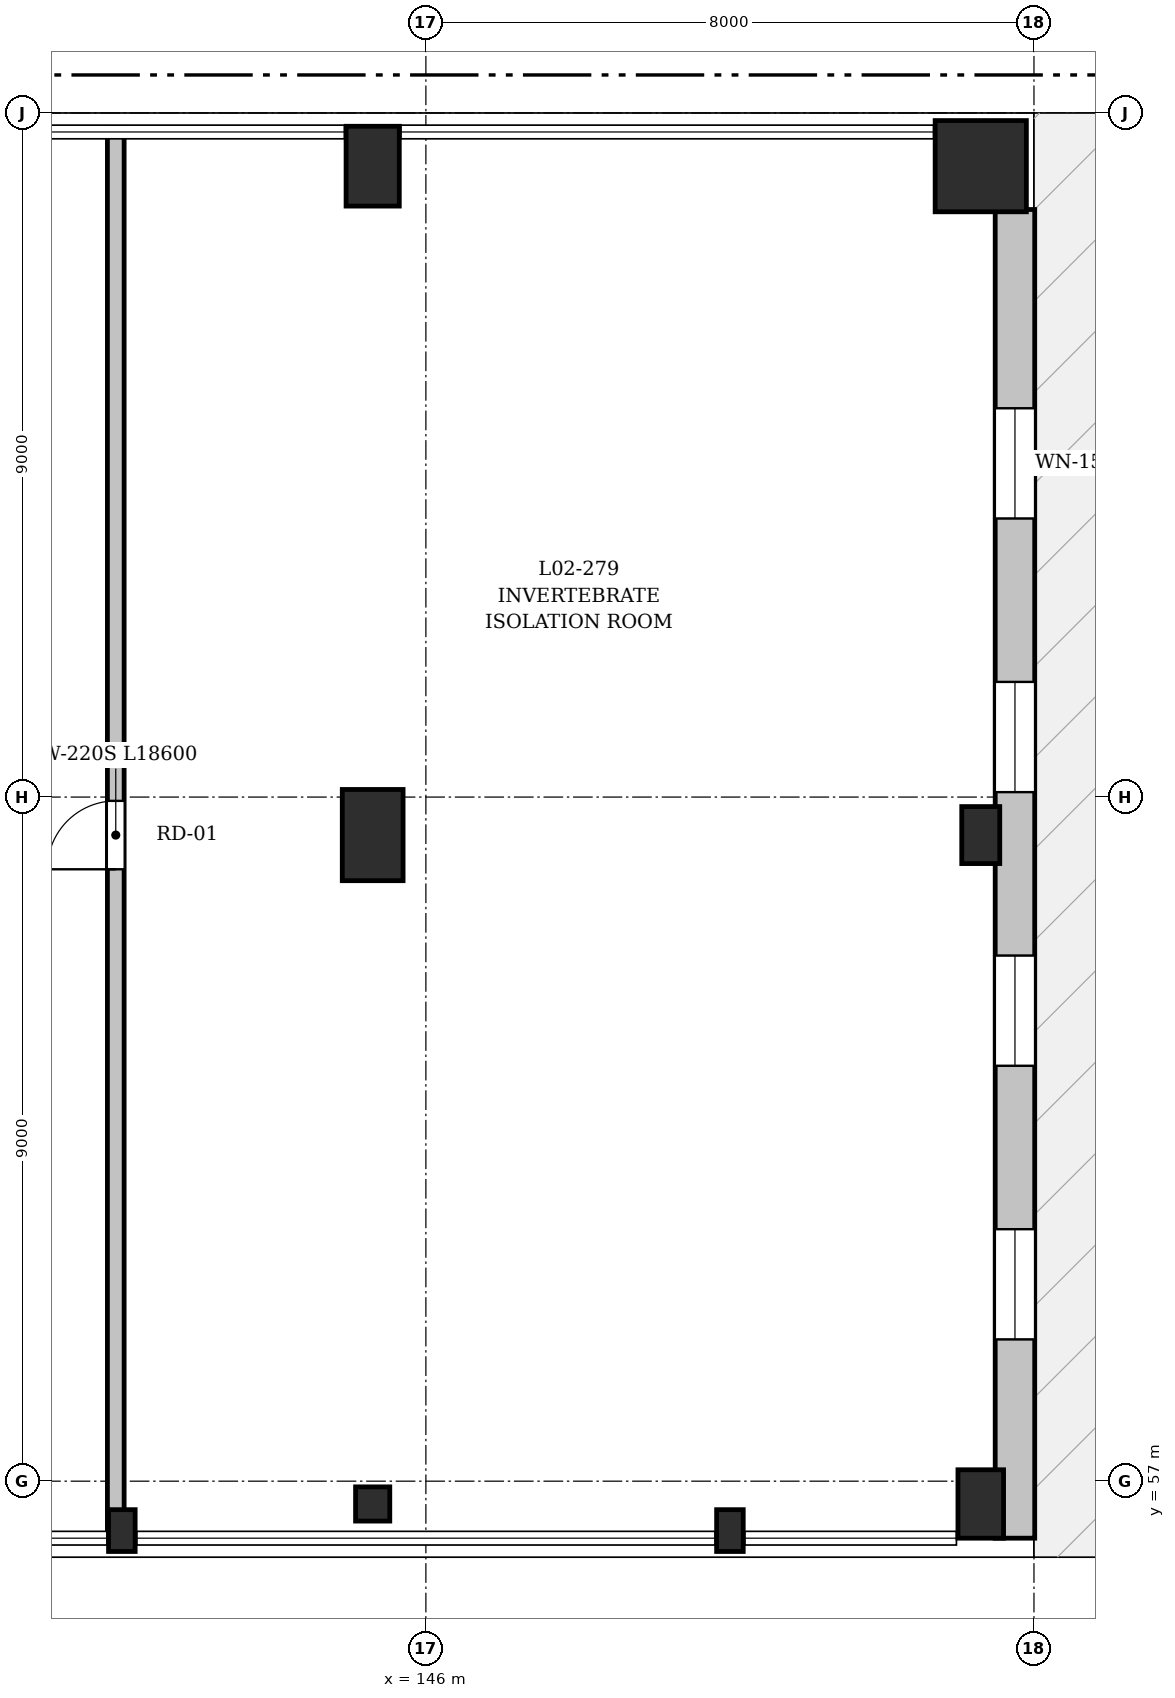
"""IFC4 building model, lengths in metres.
Left out: names, types, materials, properties, quantities, classifications, styles, units other than length and angle.
Written with IfcOpenShell. Run it as: python <this file> out.ifc"""

import sys

from ifc_helpers import new_model, si_unit, direction, frame, frame_2d, origin, origin_2d, place, context, subcontext, project, spatial, rectangle, extrude, element, fill, save


model = new_model("IFC4")
c1 = context("Model", 3, precision=1e-05, world=origin(), true_north=direction((0.0, 1.0)))
c2 = subcontext(c1, "Body", "Model", "MODEL_VIEW")
j1 = project(units=[si_unit("LENGTHUNIT", "METRE"), si_unit("PLANEANGLEUNIT", "RADIAN")], contexts=[c1])
p1 = place(None, origin())
s1 = spatial("IfcSite", under=j1, at=p1, CompositionType="ELEMENT")
p2 = place(p1, origin())
s2 = spatial("IfcBuilding", under=s1, at=p2, CompositionType="ELEMENT")
p3 = place(p2, frame((0.0, 0.0, 5.4)))
s3 = spatial("IfcBuildingStorey", under=s2, at=p3, CompositionType="ELEMENT", Elevation=5.4)
p4 = place(p3, frame((145.3, 56.7, 0.0), z_axis=(0.0, 0.0, 1.0), x_axis=(1.0, 0.0, 0.0)))
e1 = element("IfcColumn", 1, at=p4, inside=s3, PredefinedType="COLUMN", context=c2, shape_type="SweptSolid", body=[
    extrude(rectangle(XDim=0.45, YDim=0.45, at=origin_2d()), origin(), (0.0, 0.0, 1.0), 4.45),
])
p5 = place(p3, frame((145.3, 65.5, 0.0), z_axis=(0.0, 0.0, 1.0), x_axis=(1.0, 0.0, 0.0)))
e2 = element("IfcColumn", 2, at=p5, inside=s3, PredefinedType="COLUMN", context=c2, shape_type="SweptSolid", body=[
    extrude(rectangle(XDim=0.8, YDim=1.2, at=origin_2d()), origin(), (0.0, 0.0, 1.0), 4.45),
])
p6 = place(p3, frame((145.3, 74.3, 0.0), z_axis=(0.0, 0.0, 1.0), x_axis=(1.0, 0.0, 0.0)))
e3 = element("IfcColumn", 3, at=p6, inside=s3, PredefinedType="COLUMN", context=c2, shape_type="SweptSolid", body=[
    extrude(rectangle(XDim=0.7, YDim=1.05, at=origin_2d()), origin(), (0.0, 0.0, 1.0), 4.45),
])
p7 = place(p3, frame((153.3, 56.7, 0.0), z_axis=(0.0, 0.0, 1.0), x_axis=(1.0, 0.0, 0.0)))
e4 = element("IfcColumn", 4, at=p7, inside=s3, PredefinedType="COLUMN", context=c2, shape_type="SweptSolid", body=[
    extrude(rectangle(XDim=0.6, YDim=0.9, at=origin_2d()), origin(), (0.0, 0.0, 1.0), 4.45),
])
p8 = place(p3, frame((153.3, 65.5, 0.0), z_axis=(0.0, 0.0, 1.0), x_axis=(1.0, 0.0, 0.0)))
e5 = element("IfcColumn", 5, at=p8, inside=s3, PredefinedType="COLUMN", context=c2, shape_type="SweptSolid", body=[
    extrude(rectangle(XDim=0.5, YDim=0.75, at=origin_2d()), origin(), (0.0, 0.0, 1.0), 4.45),
])
p9 = place(p3, frame((153.3, 74.3, 0.0), z_axis=(0.0, 0.0, 1.0), x_axis=(1.0, 0.0, 0.0)))
e6 = element("IfcColumn", 6, at=p9, inside=s3, PredefinedType="COLUMN", context=c2, shape_type="SweptSolid", body=[
    extrude(rectangle(XDim=1.2, YDim=1.2, at=origin_2d()), origin(), (0.0, 0.0, 1.0), 4.45),
])
for number, where, z_axis, x_axis in (
    (7, (142.0, 56.35, 0.0), (0.0, 0.0, 1.0), (1.0, 0.0, 0.0)),
    (8, (150.0, 56.35, 0.0), (0.0, 0.0, 1.0), (1.0, 0.0, 0.0)),
):
    element("IfcColumn", number, at=place(p3, frame(where, z_axis=z_axis, x_axis=x_axis)), inside=s3, PredefinedType="PILASTER", context=c2, shape_type="SweptSolid", body=[
        extrude(rectangle(XDim=0.35, YDim=0.55, at=origin_2d()), origin(), (0.0, 0.0, 1.0), 4.45),
    ])
p10 = place(p3, frame((153.75, 73.73, 0.0), z_axis=(0.0, 0.0, 1.0), x_axis=(0.0, -1.0, 0.0)))
e9 = element("IfcWall", 9, at=p10, inside=s3, PredefinedType="SOLIDWALL", context=c2, shape_type="SweptSolid", body=[
    extrude(rectangle(XDim=17.48, YDim=0.52, at=frame_2d((8.74, 0.0))), origin(), (0.0, 0.0, 1.0), 3.59),
])
p11 = place(p10, frame((2.615, 0.0, 0.9)))
e10 = element("IfcOpeningElement", 10, at=p11, cuts=e9, PredefinedType="OPENING", context=c2, shape_type="SweptSolid", body=[
    extrude(rectangle(XDim=1.45, YDim=1.5, at=frame_2d((0.725, 0.75))), frame((0.0, 0.27, 0.0), z_axis=(0.0, -1.0, 0.0), x_axis=(1.0, 0.0, 0.0)), (0.0, 0.0, 1.0), 0.54),
])
p12 = place(p10, frame((6.215, 0.0, 0.9)))
e11 = element("IfcOpeningElement", 11, at=p12, cuts=e9, PredefinedType="OPENING", context=c2, shape_type="SweptSolid", body=[
    extrude(rectangle(XDim=1.45, YDim=1.5, at=frame_2d((0.725, 0.75))), frame((0.0, 0.27, 0.0), z_axis=(0.0, -1.0, 0.0), x_axis=(1.0, 0.0, 0.0)), (0.0, 0.0, 1.0), 0.54),
])
p13 = place(p10, frame((9.815, 0.0, 0.9)))
e12 = element("IfcOpeningElement", 12, at=p13, cuts=e9, PredefinedType="OPENING", context=c2, shape_type="SweptSolid", body=[
    extrude(rectangle(XDim=1.45, YDim=1.5, at=frame_2d((0.725, 0.75))), frame((0.0, 0.27, 0.0), z_axis=(0.0, -1.0, 0.0), x_axis=(1.0, 0.0, 0.0)), (0.0, 0.0, 1.0), 0.54),
])
p14 = place(p10, frame((13.415, 0.0, 0.9)))
e13 = element("IfcOpeningElement", 13, at=p14, cuts=e9, PredefinedType="OPENING", context=c2, shape_type="SweptSolid", body=[
    extrude(rectangle(XDim=1.45, YDim=1.5, at=frame_2d((0.725, 0.75))), frame((0.0, 0.27, 0.0), z_axis=(0.0, -1.0, 0.0), x_axis=(1.0, 0.0, 0.0)), (0.0, 0.0, 1.0), 0.54),
])
p15 = place(p3, frame((141.92, 56.2, 0.0), z_axis=(0.0, 0.0, 1.0), x_axis=(0.0, 1.0, 0.0)))
e14 = element("IfcWall", 14, at=p15, inside=s3, PredefinedType="SOLIDWALL", context=c2, shape_type="SweptSolid", body=[
    extrude(rectangle(XDim=18.6, YDim=0.22, at=frame_2d((9.3, 0.0))), origin(), (0.0, 0.0, 1.0), 3.44),
])
p16 = place(p15, frame((8.85, 0.0, 0.0)))
e15 = element("IfcOpeningElement", 15, at=p16, cuts=e14, PredefinedType="OPENING", context=c2, shape_type="SweptSolid", body=[
    extrude(rectangle(XDim=0.9, YDim=2.1, at=frame_2d((0.45, 1.05))), frame((0.0, 0.12, 0.0), z_axis=(0.0, -1.0, 0.0), x_axis=(1.0, 0.0, 0.0)), (0.0, 0.0, 1.0), 0.24),
])
p17 = place(p11, origin())
e16 = element("IfcWindow", 16, at=p17, inside=s3, PartitioningType="DOUBLE_PANEL_VERTICAL", PredefinedType="WINDOW", context=c2, shape_type="SweptSolid", body=[
    extrude(rectangle(XDim=1.45, YDim=1.5, at=frame_2d((0.725, 0.75))), frame((0.0, 0.03, 0.0), z_axis=(0.0, -1.0, 0.0), x_axis=(1.0, 0.0, 0.0)), (0.0, 0.0, 1.0), 0.06),
])
fill(e10, e16)
p18 = place(p12, origin())
e17 = element("IfcWindow", 17, at=p18, inside=s3, PartitioningType="DOUBLE_PANEL_VERTICAL", PredefinedType="WINDOW", context=c2, shape_type="SweptSolid", body=[
    extrude(rectangle(XDim=1.45, YDim=1.5, at=frame_2d((0.725, 0.75))), frame((0.0, 0.03, 0.0), z_axis=(0.0, -1.0, 0.0), x_axis=(1.0, 0.0, 0.0)), (0.0, 0.0, 1.0), 0.06),
])
fill(e11, e17)
p19 = place(p13, origin())
e18 = element("IfcWindow", 18, at=p19, inside=s3, PartitioningType="DOUBLE_PANEL_VERTICAL", PredefinedType="WINDOW", context=c2, shape_type="SweptSolid", body=[
    extrude(rectangle(XDim=1.45, YDim=1.5, at=frame_2d((0.725, 0.75))), frame((0.0, 0.03, 0.0), z_axis=(0.0, -1.0, 0.0), x_axis=(1.0, 0.0, 0.0)), (0.0, 0.0, 1.0), 0.06),
])
fill(e12, e18)
p20 = place(p14, origin())
e19 = element("IfcWindow", 19, at=p20, inside=s3, PartitioningType="DOUBLE_PANEL_VERTICAL", PredefinedType="WINDOW", context=c2, shape_type="SweptSolid", body=[
    extrude(rectangle(XDim=1.45, YDim=1.5, at=frame_2d((0.725, 0.75))), frame((0.0, 0.03, 0.0), z_axis=(0.0, -1.0, 0.0), x_axis=(1.0, 0.0, 0.0)), (0.0, 0.0, 1.0), 0.06),
])
fill(e13, e19)
p21 = place(p16, origin())
e20 = element("IfcDoor", 20, at=p21, inside=s3, OperationType="SINGLE_SWING_LEFT", PredefinedType="DOOR", context=c2, shape_type="SweptSolid", body=[
    extrude(rectangle(XDim=0.9, YDim=2.1, at=frame_2d((0.45, 1.05))), frame((0.0, 0.025, 0.0), z_axis=(0.0, -1.0, 0.0), x_axis=(1.0, 0.0, 0.0)), (0.0, 0.0, 1.0), 0.05),
])
fill(e15, e20)
save(model, sys.argv[1])
